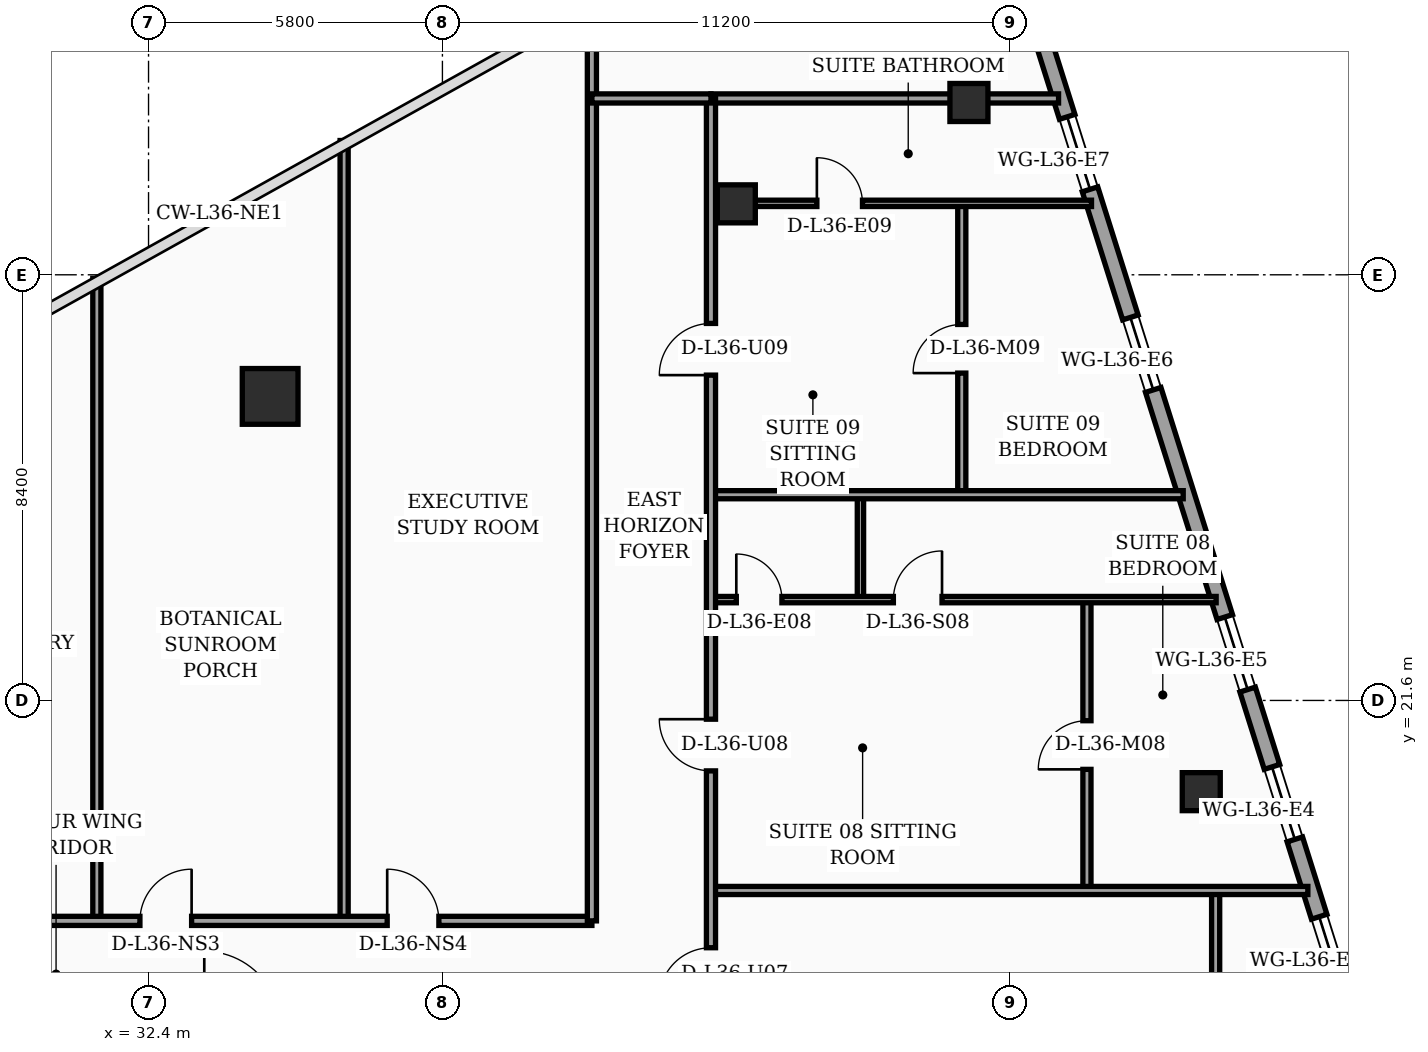
"""IFC4 building model, lengths in metres.
Left out: names, types, materials, properties, quantities, classifications, styles, units other than length and angle.
Written with IfcOpenShell. Run it as: python <this file> out.ifc"""

import sys

from ifc_helpers import new_model, si_unit, direction, frame, frame_2d, origin, origin_2d, place, context, subcontext, project, spatial, rectangle, hollow_rectangle, circle, extrude, element, fill, save


model = new_model("IFC4")
c1 = context("Model", 3, precision=1e-05, world=origin(), true_north=direction((0.0, 1.0)))
c2 = subcontext(c1, "Body", "Model", "MODEL_VIEW")
j1 = project(units=[si_unit("LENGTHUNIT", "METRE"), si_unit("PLANEANGLEUNIT", "RADIAN")], contexts=[c1])
p1 = place(None, origin())
s1 = spatial("IfcSite", under=j1, at=p1, CompositionType="ELEMENT")
p2 = place(p1, origin())
s2 = spatial("IfcBuilding", under=s1, at=p2, CompositionType="ELEMENT")
p3 = place(p2, frame((0.0, 0.0, 148.5)))
s3 = spatial("IfcBuildingStorey", under=s2, at=p3, CompositionType="ELEMENT", Elevation=148.5)
p4 = place(p3, frame((34.8, 27.6, 0.0), z_axis=(0.0, 0.0, 1.0), x_axis=(1.0, 0.0, 0.0)))
e1 = element("IfcColumn", 1, at=p4, inside=s3, PredefinedType="COLUMN", context=c2, shape_type="SweptSolid", body=[
    extrude(circle(Radius=0.55, at=origin_2d()), origin(), (0.0, 0.0, 1.0), 3.56),
])
for number, where, z_axis, x_axis in (
    (2, (44.0, 31.4, 0.0), (0.0, 0.0, 1.0), (1.0, 0.0, 0.0)),
    (3, (53.176, 19.8, 0.0), (0.0, 0.0, 1.0), (1.0, 0.0, 0.0)),
    (4, (48.591, 33.4, 0.0), (0.0, 0.0, 1.0), (1.0, 0.0, 0.0)),
):
    element("IfcColumn", number, at=place(p3, frame(where, z_axis=z_axis, x_axis=x_axis)), inside=s3, PredefinedType="COLUMN", context=c2, shape_type="SweptSolid", body=[
        extrude(hollow_rectangle(XDim=0.75, YDim=0.75, WallThickness=0.032, at=origin_2d()), origin(), (0.0, 0.0, 1.0), 3.56),
    ])
p5 = place(p3, frame((59.23, 5.505, 0.0), z_axis=(0.0, 0.0, 1.0), x_axis=(-0.300509063924, 0.953778958931, 0.0)))
e5 = element("IfcWall", 5, at=p5, inside=s3, PredefinedType="SOLIDWALL", context=c2, shape_type="SweptSolid", body=[
    extrude(rectangle(XDim=30.814, YDim=0.32, at=frame_2d((15.407, 0.0))), origin(), (0.0, 0.0, 1.0), 3.56),
])
p6 = place(p5, frame((4.747, 0.0, 0.0)))
e6 = element("IfcOpeningElement", 6, at=p6, cuts=e5, PredefinedType="OPENING", context=c2, shape_type="SweptSolid", body=[
    extrude(rectangle(XDim=1.4, YDim=2.25, at=frame_2d((0.7, 1.125))), frame((0.0, 0.17, 0.0), z_axis=(0.0, -1.0, 0.0), x_axis=(1.0, 0.0, 0.0)), (0.0, 0.0, 1.0), 0.34),
])
p7 = place(p5, frame((2.65, 0.0, 0.75)))
e7 = element("IfcOpeningElement", 7, at=p7, cuts=e5, PredefinedType="OPENING", context=c2, shape_type="SweptSolid", body=[
    extrude(rectangle(XDim=1.5, YDim=1.6, at=frame_2d((0.75, 0.8))), frame((0.0, 0.17, 0.0), z_axis=(0.0, -1.0, 0.0), x_axis=(1.0, 0.0, 0.0)), (0.0, 0.0, 1.0), 0.34),
])
p8 = place(p5, frame((7.8, 0.0, 0.75)))
e8 = element("IfcOpeningElement", 8, at=p8, cuts=e5, PredefinedType="OPENING", context=c2, shape_type="SweptSolid", body=[
    extrude(rectangle(XDim=1.5, YDim=1.6, at=frame_2d((0.75, 0.8))), frame((0.0, 0.17, 0.0), z_axis=(0.0, -1.0, 0.0), x_axis=(1.0, 0.0, 0.0)), (0.0, 0.0, 1.0), 0.34),
])
p9 = place(p5, frame((10.9, 0.0, 0.75)))
e9 = element("IfcOpeningElement", 9, at=p9, cuts=e5, PredefinedType="OPENING", context=c2, shape_type="SweptSolid", body=[
    extrude(rectangle(XDim=1.5, YDim=1.6, at=frame_2d((0.75, 0.8))), frame((0.0, 0.17, 0.0), z_axis=(0.0, -1.0, 0.0), x_axis=(1.0, 0.0, 0.0)), (0.0, 0.0, 1.0), 0.34),
])
p10 = place(p5, frame((14.0, 0.0, 0.75)))
e10 = element("IfcOpeningElement", 10, at=p10, cuts=e5, PredefinedType="OPENING", context=c2, shape_type="SweptSolid", body=[
    extrude(rectangle(XDim=1.5, YDim=1.6, at=frame_2d((0.75, 0.8))), frame((0.0, 0.17, 0.0), z_axis=(0.0, -1.0, 0.0), x_axis=(1.0, 0.0, 0.0)), (0.0, 0.0, 1.0), 0.34),
])
p11 = place(p5, frame((17.1, 0.0, 0.75)))
e11 = element("IfcOpeningElement", 11, at=p11, cuts=e5, PredefinedType="OPENING", context=c2, shape_type="SweptSolid", body=[
    extrude(rectangle(XDim=1.5, YDim=1.6, at=frame_2d((0.75, 0.8))), frame((0.0, 0.17, 0.0), z_axis=(0.0, -1.0, 0.0), x_axis=(1.0, 0.0, 0.0)), (0.0, 0.0, 1.0), 0.34),
])
p12 = place(p5, frame((23.3, 0.0, 0.75)))
e12 = element("IfcOpeningElement", 12, at=p12, cuts=e5, PredefinedType="OPENING", context=c2, shape_type="SweptSolid", body=[
    extrude(rectangle(XDim=1.5, YDim=1.6, at=frame_2d((0.75, 0.8))), frame((0.0, 0.17, 0.0), z_axis=(0.0, -1.0, 0.0), x_axis=(1.0, 0.0, 0.0)), (0.0, 0.0, 1.0), 0.34),
])
p13 = place(p5, frame((27.45, 0.0, 0.75)))
e13 = element("IfcOpeningElement", 13, at=p13, cuts=e5, PredefinedType="OPENING", context=c2, shape_type="SweptSolid", body=[
    extrude(rectangle(XDim=1.5, YDim=1.6, at=frame_2d((0.75, 0.8))), frame((0.0, 0.17, 0.0), z_axis=(0.0, -1.0, 0.0), x_axis=(1.0, 0.0, 0.0)), (0.0, 0.0, 1.0), 0.34),
])
p14 = place(p3, frame((31.38, 17.25, 0.0), z_axis=(0.0, 0.0, 1.0), x_axis=(0.0, 1.0, 0.0)))
e14 = element("IfcWall", 14, at=p14, inside=s3, PredefinedType="PARTITIONING", context=c2, shape_type="SweptSolid", body=[
    extrude(rectangle(XDim=12.68, YDim=0.16, at=frame_2d((6.34, 0.0))), origin(), (0.0, 0.0, 1.0), 2.94),
])
p15 = place(p3, frame((36.26, 17.25, 0.0), z_axis=(0.0, 0.0, 1.0), x_axis=(0.0, 1.0, 0.0)))
e15 = element("IfcWall", 15, at=p15, inside=s3, PredefinedType="PARTITIONING", context=c2, shape_type="SweptSolid", body=[
    extrude(rectangle(XDim=15.4, YDim=0.16, at=frame_2d((7.7, 0.0))), origin(), (0.0, 0.0, 1.0), 2.94),
])
p16 = place(p3, frame((21.5, 17.25, 0.0), z_axis=(0.0, 0.0, 1.0), x_axis=(1.0, 0.0, 0.0)))
e16 = element("IfcWall", 16, at=p16, inside=s3, PredefinedType="PARTITIONING", context=c2, shape_type="SweptSolid", body=[
    extrude(rectangle(XDim=19.65, YDim=0.18, at=frame_2d((9.825, 0.0))), origin(), (0.0, 0.0, 1.0), 2.94),
])
p17 = place(p16, frame((0.95, 0.0, 0.0)))
e17 = element("IfcOpeningElement", 17, at=p17, cuts=e16, PredefinedType="OPENING", context=c2, shape_type="SweptSolid", body=[
    extrude(rectangle(XDim=1.02, YDim=2.2, at=frame_2d((0.51, 1.1))), frame((0.0, 0.1, 0.0), z_axis=(0.0, -1.0, 0.0), x_axis=(1.0, 0.0, 0.0)), (0.0, 0.0, 1.0), 0.2),
])
p18 = place(p16, frame((6.49, 0.0, 0.0)))
e18 = element("IfcOpeningElement", 18, at=p18, cuts=e16, PredefinedType="OPENING", context=c2, shape_type="SweptSolid", body=[
    extrude(rectangle(XDim=1.02, YDim=2.2, at=frame_2d((0.51, 1.1))), frame((0.0, 0.1, 0.0), z_axis=(0.0, -1.0, 0.0), x_axis=(1.0, 0.0, 0.0)), (0.0, 0.0, 1.0), 0.2),
])
p19 = place(p16, frame((10.73, 0.0, 0.0)))
e19 = element("IfcOpeningElement", 19, at=p19, cuts=e16, PredefinedType="OPENING", context=c2, shape_type="SweptSolid", body=[
    extrude(rectangle(XDim=1.02, YDim=2.2, at=frame_2d((0.51, 1.1))), frame((0.0, 0.1, 0.0), z_axis=(0.0, -1.0, 0.0), x_axis=(1.0, 0.0, 0.0)), (0.0, 0.0, 1.0), 0.2),
])
p20 = place(p16, frame((15.61, 0.0, 0.0)))
e20 = element("IfcOpeningElement", 20, at=p20, cuts=e16, PredefinedType="OPENING", context=c2, shape_type="SweptSolid", body=[
    extrude(rectangle(XDim=1.02, YDim=2.2, at=frame_2d((0.51, 1.1))), frame((0.0, 0.1, 0.0), z_axis=(0.0, -1.0, 0.0), x_axis=(1.0, 0.0, 0.0)), (0.0, 0.0, 1.0), 0.2),
])
p21 = place(p3, frame((41.15, 17.25, 0.0), z_axis=(0.0, 0.0, 1.0), x_axis=(0.0, 1.0, 0.0)))
e21 = element("IfcWall", 21, at=p21, inside=s3, PredefinedType="PARTITIONING", context=c2, shape_type="SweptSolid", body=[
    extrude(rectangle(XDim=18.13, YDim=0.18, at=frame_2d((9.065, 0.0))), origin(), (0.0, 0.0, 1.0), 2.94),
])
p22 = place(p3, frame((53.46, 7.45, 0.0), z_axis=(0.0, 0.0, 1.0), x_axis=(0.0, 1.0, 0.0)))
e22 = element("IfcWall", 22, at=p22, inside=s3, PredefinedType="PARTITIONING", context=c2, shape_type="SweptSolid", body=[
    extrude(rectangle(XDim=10.4, YDim=0.16, at=frame_2d((5.2, 0.0))), origin(), (0.0, 0.0, 1.0), 3.04),
])
p23 = place(p22, frame((4.72, 0.0, 0.0)))
e23 = element("IfcOpeningElement", 23, at=p23, cuts=e22, PredefinedType="OPENING", context=c2, shape_type="SweptSolid", body=[
    extrude(rectangle(XDim=0.96, YDim=2.2, at=frame_2d((0.48, 1.1))), frame((0.0, 0.09, 0.0), z_axis=(0.0, -1.0, 0.0), x_axis=(1.0, 0.0, 0.0)), (0.0, 0.0, 1.0), 0.18),
])
p24 = place(p3, frame((46.45, 23.59, 0.0), z_axis=(0.0, 0.0, 1.0), x_axis=(0.0, 1.0, 0.0)))
e24 = element("IfcWall", 24, at=p24, inside=s3, PredefinedType="PARTITIONING", context=c2, shape_type="SweptSolid", body=[
    extrude(rectangle(XDim=2.07, YDim=0.125, at=frame_2d((1.035, 0.0))), origin(), (0.0, 0.0, 1.0), 3.19),
])
p25 = place(p3, frame((50.92, 17.85, 0.0), z_axis=(0.0, 0.0, 1.0), x_axis=(0.0, 1.0, 0.0)))
e25 = element("IfcWall", 25, at=p25, inside=s3, PredefinedType="PARTITIONING", context=c2, shape_type="SweptSolid", body=[
    extrude(rectangle(XDim=5.74, YDim=0.16, at=frame_2d((2.87, 0.0))), origin(), (0.0, 0.0, 1.0), 2.94),
])
p26 = place(p25, frame((2.39, 0.0, 0.0)))
e26 = element("IfcOpeningElement", 26, at=p26, cuts=e25, PredefinedType="OPENING", context=c2, shape_type="SweptSolid", body=[
    extrude(rectangle(XDim=0.96, YDim=2.2, at=frame_2d((0.48, 1.1))), frame((0.0, 0.09, 0.0), z_axis=(0.0, -1.0, 0.0), x_axis=(1.0, 0.0, 0.0)), (0.0, 0.0, 1.0), 0.18),
])
p27 = place(p3, frame((43.5, 23.59, 0.0), z_axis=(0.0, 0.0, 1.0), x_axis=(1.0, 0.0, 0.0)))
e27 = element("IfcWall", 27, at=p27, inside=s3, PredefinedType="PARTITIONING", context=c2, shape_type="SweptSolid", body=[
    extrude(rectangle(XDim=9.97, YDim=0.125, at=frame_2d((4.985, 0.0))), origin(), (0.0, 0.0, 1.0), 2.94),
])
p28 = place(p27, frame((0.5, 0.0, 0.0)))
e28 = element("IfcOpeningElement", 28, at=p28, cuts=e27, PredefinedType="OPENING", context=c2, shape_type="SweptSolid", body=[
    extrude(rectangle(XDim=0.9, YDim=2.15, at=frame_2d((0.45, 1.075))), frame((0.0, 0.073, 0.0), z_axis=(0.0, -1.0, 0.0), x_axis=(1.0, 0.0, 0.0)), (0.0, 0.0, 1.0), 0.145),
])
p29 = place(p27, frame((3.6, 0.0, 0.0)))
e29 = element("IfcOpeningElement", 29, at=p29, cuts=e27, PredefinedType="OPENING", context=c2, shape_type="SweptSolid", body=[
    extrude(rectangle(XDim=0.96, YDim=2.2, at=frame_2d((0.48, 1.1))), frame((0.0, 0.073, 0.0), z_axis=(0.0, -1.0, 0.0), x_axis=(1.0, 0.0, 0.0)), (0.0, 0.0, 1.0), 0.145),
])
p30 = place(p3, frame((48.45, 25.66, 0.0), z_axis=(0.0, 0.0, 1.0), x_axis=(0.0, 1.0, 0.0)))
e30 = element("IfcWall", 30, at=p30, inside=s3, PredefinedType="PARTITIONING", context=c2, shape_type="SweptSolid", body=[
    extrude(rectangle(XDim=5.75, YDim=0.16, at=frame_2d((2.875, 0.0))), origin(), (0.0, 0.0, 1.0), 3.56),
])
p31 = place(p30, frame((2.4, 0.0, 0.0)))
e31 = element("IfcOpeningElement", 31, at=p31, cuts=e30, PredefinedType="OPENING", context=c2, shape_type="SweptSolid", body=[
    extrude(rectangle(XDim=0.96, YDim=2.2, at=frame_2d((0.48, 1.1))), frame((0.0, 0.09, 0.0), z_axis=(0.0, -1.0, 0.0), x_axis=(1.0, 0.0, 0.0)), (0.0, 0.0, 1.0), 0.18),
])
p32 = place(p3, frame((43.5, 31.41, 0.0), z_axis=(0.0, 0.0, 1.0), x_axis=(1.0, 0.0, 0.0)))
e32 = element("IfcWall", 32, at=p32, inside=s3, PredefinedType="PARTITIONING", context=c2, shape_type="SweptSolid", body=[
    extrude(rectangle(XDim=7.51, YDim=0.125, at=frame_2d((3.755, 0.0))), origin(), (0.0, 0.0, 1.0), 2.94),
])
p33 = place(p32, frame((2.09, 0.0, 0.0)))
e33 = element("IfcOpeningElement", 33, at=p33, cuts=e32, PredefinedType="OPENING", context=c2, shape_type="SweptSolid", body=[
    extrude(rectangle(XDim=0.9, YDim=2.15, at=frame_2d((0.45, 1.075))), frame((0.0, 0.073, 0.0), z_axis=(0.0, -1.0, 0.0), x_axis=(1.0, 0.0, 0.0)), (0.0, 0.0, 1.0), 0.145),
])
p34 = place(p3, frame((43.5, 25.66, 0.0), z_axis=(0.0, 0.0, 1.0), x_axis=(1.0, 0.0, 0.0)))
e34 = element("IfcWall", 34, at=p34, inside=s3, PredefinedType="PARTITIONING", context=c2, shape_type="SweptSolid", body=[
    extrude(rectangle(XDim=9.32, YDim=0.16, at=frame_2d((4.66, 0.0))), origin(), (0.0, 0.0, 1.0), 2.94),
])
p35 = place(p3, frame((43.5, 17.85, 0.0), z_axis=(0.0, 0.0, 1.0), x_axis=(1.0, 0.0, 0.0)))
e35 = element("IfcWall", 35, at=p35, inside=s3, PredefinedType="PARTITIONING", context=c2, shape_type="SweptSolid", body=[
    extrude(rectangle(XDim=11.78, YDim=0.16, at=frame_2d((5.89, 0.0))), origin(), (0.0, 0.0, 1.0), 2.94),
])
p36 = place(p3, frame((43.5, 33.48, 0.0), z_axis=(0.0, 0.0, 1.0), x_axis=(1.0, 0.0, 0.0)))
e36 = element("IfcWall", 36, at=p36, inside=s3, PredefinedType="PARTITIONING", context=c2, shape_type="SweptSolid", body=[
    extrude(rectangle(XDim=6.86, YDim=0.18, at=frame_2d((3.43, 0.0))), origin(), (0.0, 0.0, 1.0), 2.94),
])
p37 = place(p3, frame((43.5, 2.44, 0.0), z_axis=(0.0, 0.0, 1.0), x_axis=(0.0, 1.0, 0.0)))
e37 = element("IfcWall", 37, at=p37, inside=s3, PredefinedType="PARTITIONING", context=c2, shape_type="SweptSolid", body=[
    extrude(rectangle(XDim=31.04, YDim=0.18, at=frame_2d((15.52, 0.0))), origin(), (0.0, 0.0, 1.0), 2.94),
])
p38 = place(p37, frame((13.26, 0.0, 0.0)))
e38 = element("IfcOpeningElement", 38, at=p38, cuts=e37, PredefinedType="OPENING", context=c2, shape_type="SweptSolid", body=[
    extrude(rectangle(XDim=1.02, YDim=2.2, at=frame_2d((0.51, 1.1))), frame((0.0, 0.1, 0.0), z_axis=(0.0, -1.0, 0.0), x_axis=(1.0, 0.0, 0.0)), (0.0, 0.0, 1.0), 0.2),
])
p39 = place(p37, frame((17.77, 0.0, 0.0)))
e39 = element("IfcOpeningElement", 39, at=p39, cuts=e37, PredefinedType="OPENING", context=c2, shape_type="SweptSolid", body=[
    extrude(rectangle(XDim=1.02, YDim=2.2, at=frame_2d((0.51, 1.1))), frame((0.0, 0.1, 0.0), z_axis=(0.0, -1.0, 0.0), x_axis=(1.0, 0.0, 0.0)), (0.0, 0.0, 1.0), 0.2),
])
p40 = place(p37, frame((25.58, 0.0, 0.0)))
e40 = element("IfcOpeningElement", 40, at=p40, cuts=e37, PredefinedType="OPENING", context=c2, shape_type="SweptSolid", body=[
    extrude(rectangle(XDim=1.02, YDim=2.2, at=frame_2d((0.51, 1.1))), frame((0.0, 0.1, 0.0), z_axis=(0.0, -1.0, 0.0), x_axis=(1.0, 0.0, 0.0)), (0.0, 0.0, 1.0), 0.2),
])
p41 = place(p3, frame((41.15, 33.48, 0.0), z_axis=(0.0, 0.0, 1.0), x_axis=(1.0, 0.0, 0.0)))
e41 = element("IfcWall", 41, at=p41, inside=s3, PredefinedType="PARTITIONING", context=c2, shape_type="SweptSolid", body=[
    extrude(rectangle(XDim=2.35, YDim=0.18, at=frame_2d((1.175, 0.0))), origin(), (0.0, 0.0, 1.0), 3.56),
])
p42 = place(p9, origin())
e42 = element("IfcWindow", 42, at=p42, inside=s3, PartitioningType="SINGLE_PANEL", PredefinedType="WINDOW", context=c2, shape_type="SweptSolid", body=[
    extrude(rectangle(XDim=1.5, YDim=1.6, at=frame_2d((0.75, 0.8))), frame((0.0, 0.03, 0.0), z_axis=(0.0, -1.0, 0.0), x_axis=(1.0, 0.0, 0.0)), (0.0, 0.0, 1.0), 0.06),
])
fill(e9, e42)
p43 = place(p10, origin())
e43 = element("IfcWindow", 43, at=p43, inside=s3, PartitioningType="SINGLE_PANEL", PredefinedType="WINDOW", context=c2, shape_type="SweptSolid", body=[
    extrude(rectangle(XDim=1.5, YDim=1.6, at=frame_2d((0.75, 0.8))), frame((0.0, 0.03, 0.0), z_axis=(0.0, -1.0, 0.0), x_axis=(1.0, 0.0, 0.0)), (0.0, 0.0, 1.0), 0.06),
])
fill(e10, e43)
p44 = place(p11, origin())
e44 = element("IfcWindow", 44, at=p44, inside=s3, PartitioningType="SINGLE_PANEL", PredefinedType="WINDOW", context=c2, shape_type="SweptSolid", body=[
    extrude(rectangle(XDim=1.5, YDim=1.6, at=frame_2d((0.75, 0.8))), frame((0.0, 0.03, 0.0), z_axis=(0.0, -1.0, 0.0), x_axis=(1.0, 0.0, 0.0)), (0.0, 0.0, 1.0), 0.06),
])
fill(e11, e44)
p45 = place(p12, origin())
e45 = element("IfcWindow", 45, at=p45, inside=s3, PartitioningType="SINGLE_PANEL", PredefinedType="WINDOW", context=c2, shape_type="SweptSolid", body=[
    extrude(rectangle(XDim=1.5, YDim=1.6, at=frame_2d((0.75, 0.8))), frame((0.0, 0.03, 0.0), z_axis=(0.0, -1.0, 0.0), x_axis=(1.0, 0.0, 0.0)), (0.0, 0.0, 1.0), 0.06),
])
fill(e12, e45)
p46 = place(p13, origin())
e46 = element("IfcWindow", 46, at=p46, inside=s3, PartitioningType="SINGLE_PANEL", PredefinedType="WINDOW", context=c2, shape_type="SweptSolid", body=[
    extrude(rectangle(XDim=1.5, YDim=1.6, at=frame_2d((0.75, 0.8))), frame((0.0, 0.03, 0.0), z_axis=(0.0, -1.0, 0.0), x_axis=(1.0, 0.0, 0.0)), (0.0, 0.0, 1.0), 0.06),
])
fill(e13, e46)
p47 = place(p19, origin())
e47 = element("IfcDoor", 47, at=p47, inside=s3, OperationType="SINGLE_SWING_RIGHT", PredefinedType="DOOR", context=c2, shape_type="SweptSolid", body=[
    extrude(rectangle(XDim=1.02, YDim=2.2, at=frame_2d((0.51, 1.1))), frame((0.0, 0.025, 0.0), z_axis=(0.0, -1.0, 0.0), x_axis=(1.0, 0.0, 0.0)), (0.0, 0.0, 1.0), 0.05),
])
fill(e19, e47)
p48 = place(p20, origin())
e48 = element("IfcDoor", 48, at=p48, inside=s3, OperationType="SINGLE_SWING_LEFT", PredefinedType="DOOR", context=c2, shape_type="SweptSolid", body=[
    extrude(rectangle(XDim=1.02, YDim=2.2, at=frame_2d((0.51, 1.1))), frame((0.0, 0.025, 0.0), z_axis=(0.0, -1.0, 0.0), x_axis=(1.0, 0.0, 0.0)), (0.0, 0.0, 1.0), 0.05),
])
fill(e20, e48)
p49 = place(p26, origin())
e49 = element("IfcDoor", 49, at=p49, inside=s3, OperationType="SINGLE_SWING_LEFT", PredefinedType="DOOR", context=c2, shape_type="SweptSolid", body=[
    extrude(rectangle(XDim=0.96, YDim=2.2, at=frame_2d((0.48, 1.1))), frame((0.0, 0.025, 0.0), z_axis=(0.0, -1.0, 0.0), x_axis=(1.0, 0.0, 0.0)), (0.0, 0.0, 1.0), 0.05),
])
fill(e26, e49)
p50 = place(p28, origin())
e50 = element("IfcDoor", 50, at=p50, inside=s3, OperationType="SINGLE_SWING_LEFT", PredefinedType="DOOR", context=c2, shape_type="SweptSolid", body=[
    extrude(rectangle(XDim=0.9, YDim=2.15, at=frame_2d((0.45, 1.075))), frame((0.0, 0.025, 0.0), z_axis=(0.0, -1.0, 0.0), x_axis=(1.0, 0.0, 0.0)), (0.0, 0.0, 1.0), 0.05),
])
fill(e28, e50)
p51 = place(p29, origin())
e51 = element("IfcDoor", 51, at=p51, inside=s3, OperationType="SINGLE_SWING_RIGHT", PredefinedType="DOOR", context=c2, shape_type="SweptSolid", body=[
    extrude(rectangle(XDim=0.96, YDim=2.2, at=frame_2d((0.48, 1.1))), frame((0.0, 0.025, 0.0), z_axis=(0.0, -1.0, 0.0), x_axis=(1.0, 0.0, 0.0)), (0.0, 0.0, 1.0), 0.05),
])
fill(e29, e51)
p52 = place(p31, origin())
e52 = element("IfcDoor", 52, at=p52, inside=s3, OperationType="SINGLE_SWING_LEFT", PredefinedType="DOOR", context=c2, shape_type="SweptSolid", body=[
    extrude(rectangle(XDim=0.96, YDim=2.2, at=frame_2d((0.48, 1.1))), frame((0.0, 0.025, 0.0), z_axis=(0.0, -1.0, 0.0), x_axis=(1.0, 0.0, 0.0)), (0.0, 0.0, 1.0), 0.05),
])
fill(e31, e52)
p53 = place(p33, origin())
e53 = element("IfcDoor", 53, at=p53, inside=s3, OperationType="SINGLE_SWING_LEFT", PredefinedType="DOOR", context=c2, shape_type="SweptSolid", body=[
    extrude(rectangle(XDim=0.9, YDim=2.15, at=frame_2d((0.45, 1.075))), frame((0.0, 0.025, 0.0), z_axis=(0.0, -1.0, 0.0), x_axis=(1.0, 0.0, 0.0)), (0.0, 0.0, 1.0), 0.05),
])
fill(e33, e53)
p54 = place(p38, origin())
e54 = element("IfcDoor", 54, at=p54, inside=s3, OperationType="SINGLE_SWING_LEFT", PredefinedType="DOOR", context=c2, shape_type="SweptSolid", body=[
    extrude(rectangle(XDim=1.02, YDim=2.2, at=frame_2d((0.51, 1.1))), frame((0.0, 0.025, 0.0), z_axis=(0.0, -1.0, 0.0), x_axis=(1.0, 0.0, 0.0)), (0.0, 0.0, 1.0), 0.05),
])
fill(e38, e54)
p55 = place(p39, origin())
e55 = element("IfcDoor", 55, at=p55, inside=s3, OperationType="SINGLE_SWING_RIGHT", PredefinedType="DOOR", context=c2, shape_type="SweptSolid", body=[
    extrude(rectangle(XDim=1.02, YDim=2.2, at=frame_2d((0.51, 1.1))), frame((0.0, 0.025, 0.0), z_axis=(0.0, -1.0, 0.0), x_axis=(1.0, 0.0, 0.0)), (0.0, 0.0, 1.0), 0.05),
])
fill(e39, e55)
p56 = place(p40, origin())
e56 = element("IfcDoor", 56, at=p56, inside=s3, OperationType="SINGLE_SWING_LEFT", PredefinedType="DOOR", context=c2, shape_type="SweptSolid", body=[
    extrude(rectangle(XDim=1.02, YDim=2.2, at=frame_2d((0.51, 1.1))), frame((0.0, 0.025, 0.0), z_axis=(0.0, -1.0, 0.0), x_axis=(1.0, 0.0, 0.0)), (0.0, 0.0, 1.0), 0.05),
])
fill(e40, e56)
save(model, sys.argv[1])
